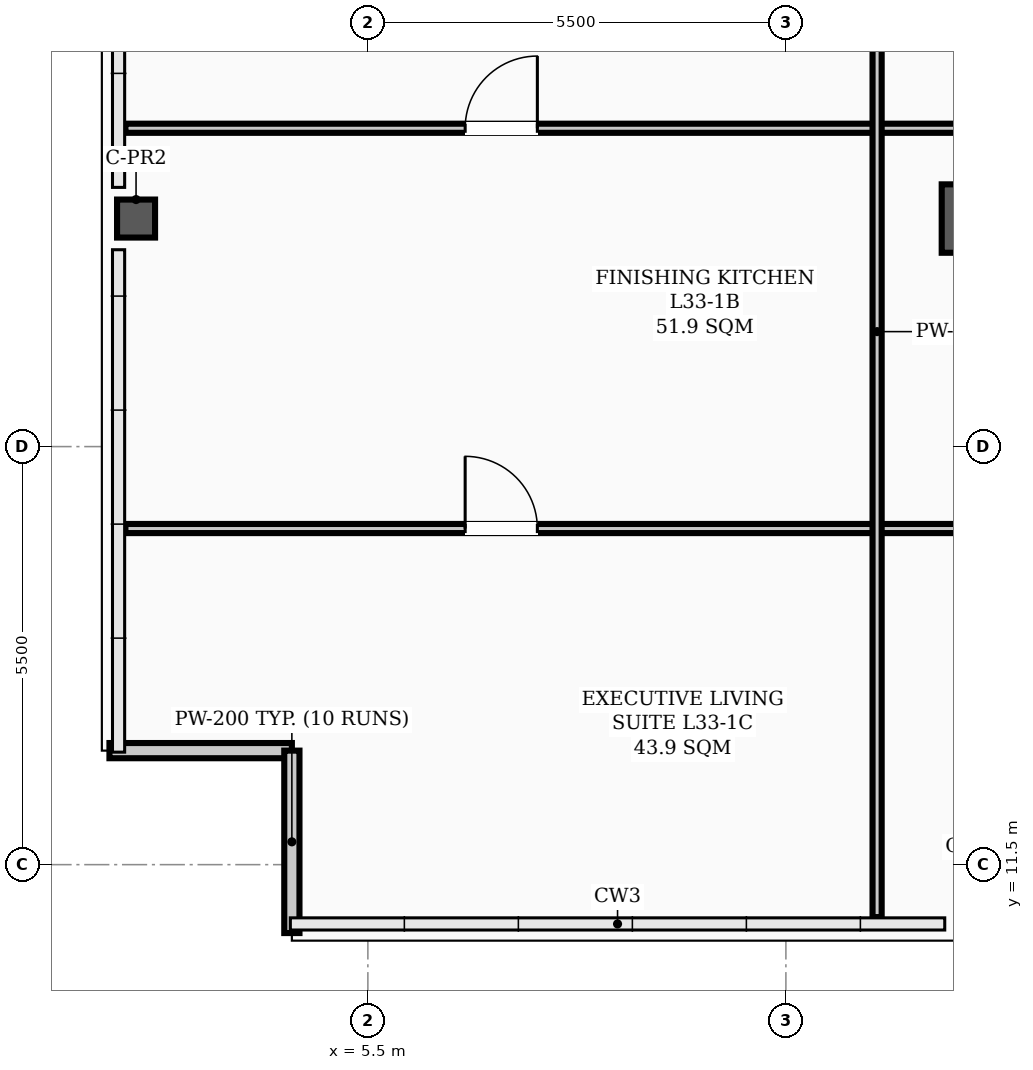
"""IFC4 building model, lengths in metres.
Left out: names, types, materials, properties, quantities, classifications, styles, units other than length and angle.
Written with IfcOpenShell. Run it as: python <this file> out.ifc"""

import sys

from ifc_helpers import new_model, si_unit, direction, frame, frame_2d, origin, origin_2d, place, context, subcontext, project, spatial, rectangle, hollow_rectangle, extrude, element, fill, save


model = new_model("IFC4")
c1 = context("Model", 3, precision=1e-05, world=origin(), true_north=direction((0.0, 1.0)))
c2 = subcontext(c1, "Body", "Model", "MODEL_VIEW")
j1 = project(units=[si_unit("LENGTHUNIT", "METRE"), si_unit("PLANEANGLEUNIT", "RADIAN")], contexts=[c1])
p1 = place(None, origin())
s1 = spatial("IfcSite", under=j1, at=p1, CompositionType="ELEMENT")
p2 = place(p1, origin())
s2 = spatial("IfcBuilding", under=s1, at=p2, CompositionType="ELEMENT")
p3 = place(p2, frame((0.0, 0.0, 134.4)))
s3 = spatial("IfcBuildingStorey", under=s2, at=p3, CompositionType="ELEMENT", Elevation=134.4)
p4 = place(p3, frame((13.5, 20.0, 0.0), z_axis=(0.0, 0.0, 1.0), x_axis=(1.0, 0.0, 0.0)))
e1 = element("IfcColumn", 1, at=p4, inside=s3, PredefinedType="COLUMN", context=c2, shape_type="SweptSolid", body=[
    extrude(hollow_rectangle(XDim=0.9, YDim=0.9, WallThickness=0.035, InnerFilletRadius=0.017, OuterFilletRadius=0.052, at=origin_2d()), origin(), (0.0, 0.0, 1.0), 3.9),
])
p5 = place(p3, frame((2.45, 20.0, 0.0), z_axis=(0.0, 0.0, 1.0), x_axis=(1.0, 0.0, 0.0)))
e2 = element("IfcColumn", 2, at=p5, inside=s3, PredefinedType="COLUMN", context=c2, shape_type="SweptSolid", body=[
    extrude(hollow_rectangle(XDim=0.5, YDim=0.5, WallThickness=0.024, InnerFilletRadius=0.012, OuterFilletRadius=0.036, at=origin_2d()), origin(), (0.0, 0.0, 1.0), 3.9),
])
for number, where, z_axis, x_axis in (
    (3, (2.1, 13.0, 0.0), (0.0, 0.0, 1.0), (1.0, 0.0, 0.0)),
    (4, (4.5, 13.0, 0.0), (0.0, 0.0, 1.0), (0.0, -1.0, 0.0)),
):
    element("IfcWall", number, at=place(p3, frame(where, z_axis=z_axis, x_axis=x_axis)), inside=s3, PredefinedType="PARAPET", context=c2, shape_type="SweptSolid", body=[
        extrude(rectangle(XDim=2.4, YDim=0.2, at=frame_2d((1.2, 0.0))), origin(), (0.0, 0.0, 1.0), 1.2),
    ])
p6 = place(p3, frame((2.31, 21.188, 0.0), z_axis=(0.0, 0.0, 1.0), x_axis=(1.0, 0.0, 0.0)))
e5 = element("IfcWall", 5, at=p6, inside=s3, PredefinedType="PARTITIONING", context=c2, shape_type="SweptSolid", body=[
    extrude(rectangle(XDim=9.89, YDim=0.12, at=frame_2d((4.945, 0.0))), origin(), (0.0, 0.0, 1.0), 3.212),
])
p7 = place(p6, frame((4.47, 0.0, 0.0)))
e6 = element("IfcOpeningElement", 6, at=p7, cuts=e5, PredefinedType="OPENING", context=c2, shape_type="SweptSolid", body=[
    extrude(rectangle(XDim=0.95, YDim=2.08, at=frame_2d((0.475, 1.04))), frame((0.0, 0.07, 0.0), z_axis=(0.0, -1.0, 0.0), x_axis=(1.0, 0.0, 0.0)), (0.0, 0.0, 1.0), 0.14),
])
p8 = place(p3, frame((2.31, 15.922, 0.0), z_axis=(0.0, 0.0, 1.0), x_axis=(1.0, 0.0, 0.0)))
e7 = element("IfcWall", 7, at=p8, inside=s3, PredefinedType="PARTITIONING", context=c2, shape_type="SweptSolid", body=[
    extrude(rectangle(XDim=9.89, YDim=0.12, at=frame_2d((4.945, 0.0))), origin(), (0.0, 0.0, 1.0), 3.72),
])
p9 = place(p8, frame((4.47, 0.0, 0.0)))
e8 = element("IfcOpeningElement", 8, at=p9, cuts=e7, PredefinedType="OPENING", context=c2, shape_type="SweptSolid", body=[
    extrude(rectangle(XDim=0.95, YDim=2.08, at=frame_2d((0.475, 1.04))), frame((0.0, 0.07, 0.0), z_axis=(0.0, -1.0, 0.0), x_axis=(1.0, 0.0, 0.0)), (0.0, 0.0, 1.0), 0.14),
])
p10 = place(p3, frame((12.2, 21.188, 0.0), z_axis=(0.0, 0.0, 1.0), x_axis=(1.0, 0.0, 0.0)))
e9 = element("IfcWall", 9, at=p10, inside=s3, PredefinedType="PARTITIONING", context=c2, shape_type="SweptSolid", body=[
    extrude(rectangle(XDim=6.2, YDim=0.12, at=frame_2d((3.1, 0.0))), origin(), (0.0, 0.0, 1.0), 3.1),
])
p11 = place(p10, frame((2.625, 0.0, 0.0)))
e10 = element("IfcOpeningElement", 10, at=p11, cuts=e9, PredefinedType="OPENING", context=c2, shape_type="SweptSolid", body=[
    extrude(rectangle(XDim=0.95, YDim=2.08, at=frame_2d((0.475, 1.04))), frame((0.0, 0.07, 0.0), z_axis=(0.0, -1.0, 0.0), x_axis=(1.0, 0.0, 0.0)), (0.0, 0.0, 1.0), 0.14),
])
p12 = place(p3, frame((12.2, 15.922, 0.0), z_axis=(0.0, 0.0, 1.0), x_axis=(1.0, 0.0, 0.0)))
e11 = element("IfcWall", 11, at=p12, inside=s3, PredefinedType="PARTITIONING", context=c2, shape_type="SweptSolid", body=[
    extrude(rectangle(XDim=6.2, YDim=0.12, at=frame_2d((3.1, 0.0))), origin(), (0.0, 0.0, 1.0), 3.1),
])
p13 = place(p12, frame((2.625, 0.0, 0.0)))
e12 = element("IfcOpeningElement", 12, at=p13, cuts=e11, PredefinedType="OPENING", context=c2, shape_type="SweptSolid", body=[
    extrude(rectangle(XDim=0.95, YDim=2.08, at=frame_2d((0.475, 1.04))), frame((0.0, 0.07, 0.0), z_axis=(0.0, -1.0, 0.0), x_axis=(1.0, 0.0, 0.0)), (0.0, 0.0, 1.0), 0.14),
])
p14 = place(p3, frame((12.2, 10.81, 0.0), z_axis=(0.0, 0.0, 1.0), x_axis=(0.0, 1.0, 0.0)))
e13 = element("IfcWall", 13, at=p14, inside=s3, PredefinedType="PARTITIONING", context=c2, shape_type="SweptSolid", body=[
    extrude(rectangle(XDim=15.405, YDim=0.12, at=frame_2d((7.703, 0.0))), origin(), (0.0, 0.0, 1.0), 3.0),
])
p15 = place(p14, frame((13.415, 0.0, 0.0)))
e14 = element("IfcOpeningElement", 14, at=p15, cuts=e13, PredefinedType="OPENING", context=c2, shape_type="SweptSolid", body=[
    extrude(rectangle(XDim=0.95, YDim=2.08, at=frame_2d((0.475, 1.04))), frame((0.0, 0.07, 0.0), z_axis=(0.0, -1.0, 0.0), x_axis=(1.0, 0.0, 0.0)), (0.0, 0.0, 1.0), 0.14),
])
p16 = place(p7, origin())
e15 = element("IfcDoor", 15, at=p16, inside=s3, OperationType="SINGLE_SWING_RIGHT", PredefinedType="DOOR", context=c2, shape_type="SweptSolid", body=[
    extrude(rectangle(XDim=0.95, YDim=2.08, at=frame_2d((0.475, 1.04))), frame((0.0, 0.025, 0.0), z_axis=(0.0, -1.0, 0.0), x_axis=(1.0, 0.0, 0.0)), (0.0, 0.0, 1.0), 0.05),
])
fill(e6, e15)
p17 = place(p9, origin())
e16 = element("IfcDoor", 16, at=p17, inside=s3, OperationType="SINGLE_SWING_LEFT", PredefinedType="DOOR", context=c2, shape_type="SweptSolid", body=[
    extrude(rectangle(XDim=0.95, YDim=2.08, at=frame_2d((0.475, 1.04))), frame((0.0, 0.025, 0.0), z_axis=(0.0, -1.0, 0.0), x_axis=(1.0, 0.0, 0.0)), (0.0, 0.0, 1.0), 0.05),
])
fill(e8, e16)
save(model, sys.argv[1])
